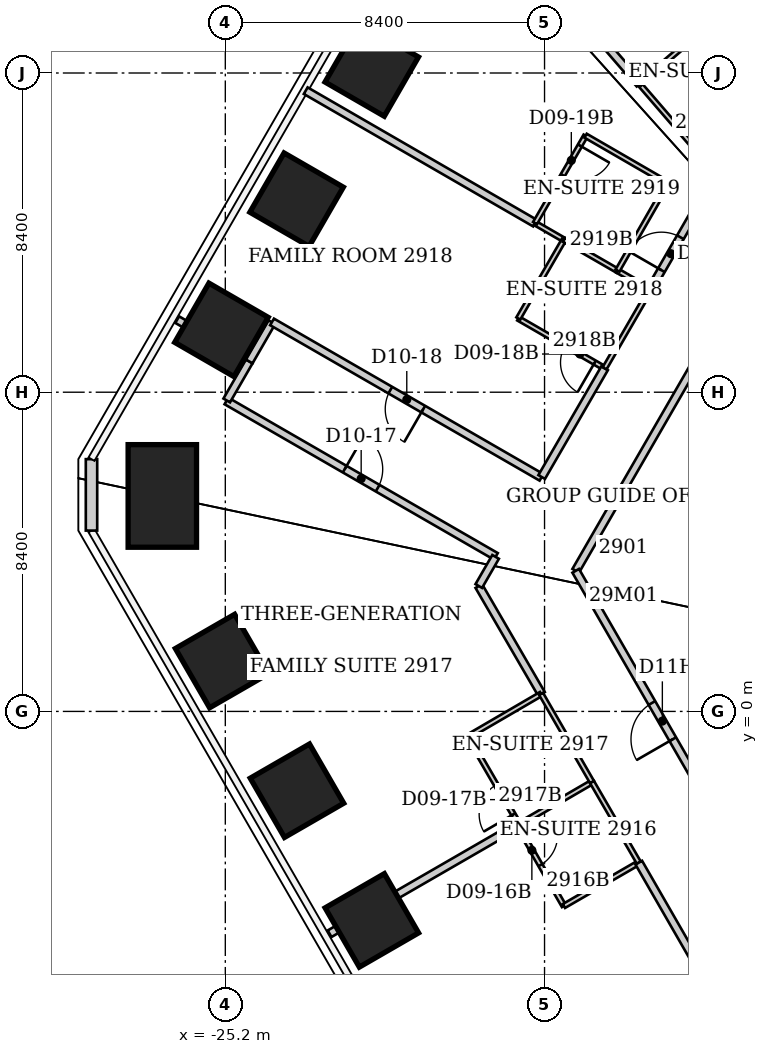
"""IFC4 building model, lengths in metres.
Left out: names, types, materials, properties, quantities, classifications, styles, units other than length and angle.
Written with IfcOpenShell. Run it as: python <this file> out.ifc"""

import sys

from ifc_helpers import new_model, si_unit, direction, frame, frame_2d, origin, origin_2d, place, context, subcontext, project, spatial, rectangle, extrude, element, fill, save


model = new_model("IFC4")
c1 = context("Model", 3, precision=1e-05, world=origin(), true_north=direction((0.0, 1.0)))
c2 = subcontext(c1, "Body", "Model", "MODEL_VIEW")
j1 = project(units=[si_unit("LENGTHUNIT", "METRE"), si_unit("PLANEANGLEUNIT", "RADIAN")], contexts=[c1])
p1 = place(None, origin())
s1 = spatial("IfcSite", under=j1, at=p1, CompositionType="ELEMENT")
p2 = place(p1, origin())
s2 = spatial("IfcBuilding", under=s1, at=p2, CompositionType="ELEMENT")
p3 = place(p2, frame((0.0, 0.0, 119.6)))
s3 = spatial("IfcBuildingStorey", under=s2, at=p3, CompositionType="ELEMENT", Elevation=119.6)
for number, where, z_axis, x_axis in (
    (1, (-21.344, -5.499, 0.0), (0.0, 0.0, 1.0), (-0.866, -0.5, 0.0)),
    (2, (-23.314, -2.087, 0.0), (0.0, 0.0, 1.0), (-0.866, -0.5, 0.0)),
    (3, (-25.284, 1.325, 0.0), (0.0, 0.0, 1.0), (-0.866, -0.5, 0.0)),
):
    element("IfcColumn", number, at=place(p3, frame(where, z_axis=z_axis, x_axis=x_axis)), inside=s3, PredefinedType="COLUMN", context=c2, shape_type="SweptSolid", body=[
        extrude(rectangle(XDim=1.8, YDim=1.8, at=origin_2d()), origin(), (0.0, 0.0, 1.0), 3.8),
    ])
p4 = place(p3, frame((-26.857, 5.67, 0.0), z_axis=(0.0, 0.0, 1.0), x_axis=(-1.0, 0.0, 0.0)))
e4 = element("IfcColumn", 4, at=p4, inside=s3, PredefinedType="COLUMN", context=c2, shape_type="SweptSolid", body=[
    extrude(rectangle(XDim=1.8, YDim=2.7, at=origin_2d()), origin(), (0.0, 0.0, 1.0), 3.8),
])
for number, where, z_axis, x_axis in (
    (5, (-25.302, 10.041, 0.0), (0.0, 0.0, 1.0), (-0.866, 0.5, 0.0)),
    (6, (-23.324, 13.466, 0.0), (0.0, 0.0, 1.0), (-0.866, 0.5, 0.0)),
    (7, (-21.346, 16.891, 0.0), (0.0, 0.0, 1.0), (-0.866, 0.5, 0.0)),
):
    element("IfcColumn", number, at=place(p3, frame(where, z_axis=z_axis, x_axis=x_axis)), inside=s3, PredefinedType="COLUMN", context=c2, shape_type="SweptSolid", body=[
        extrude(rectangle(XDim=1.8, YDim=1.8, at=origin_2d()), origin(), (0.0, 0.0, 1.0), 3.8),
    ])
p5 = place(p3, frame((-28.721, 4.759, 0.0), z_axis=(0.0, 0.0, 1.0), x_axis=(0.0, 1.0, 0.0)))
e8 = element("IfcWall", 8, at=p5, inside=s3, PredefinedType="SOLIDWALL", context=c2, shape_type="SweptSolid", body=[
    extrude(rectangle(XDim=1.88, YDim=0.3, at=frame_2d((0.94, 0.0))), origin(), (0.0, 0.0, 1.0), 3.64),
])
p6 = place(p3, frame((-26.466, 10.31, 0.0), z_axis=(0.0, 0.0, 1.0), x_axis=(0.865037029405, -0.501708020425, 0.0)))
e9 = element("IfcWall", 9, at=p6, inside=s3, PredefinedType="PARTITIONING", context=c2, shape_type="SweptSolid", body=[
    extrude(rectangle(XDim=2.177, YDim=0.2, at=frame_2d((1.089, 0.0))), origin(), (0.0, 0.0, 1.0), 3.64),
])
p7 = place(p3, frame((-25.17, 8.17, 0.0), z_axis=(0.0, 0.0, 1.0), x_axis=(0.866209421097, -0.499681137129, 0.0)))
e10 = element("IfcWall", 10, at=p7, inside=s3, PredefinedType="PARTITIONING", context=c2, shape_type="SweptSolid", body=[
    extrude(rectangle(XDim=8.185, YDim=0.2, at=frame_2d((4.092, 0.0))), origin(), (0.0, 0.0, 1.0), 3.64),
])
p8 = place(p7, frame((3.593, 0.0, 0.0)))
e11 = element("IfcOpeningElement", 11, at=p8, cuts=e10, PredefinedType="OPENING", context=c2, shape_type="SweptSolid", body=[
    extrude(rectangle(XDim=1.0, YDim=2.13, at=frame_2d((0.5, 1.065))), frame((0.0, 0.1, 0.0), z_axis=(0.0, -1.0, 0.0), x_axis=(1.0, 0.0, 0.0)), (0.0, 0.0, 1.0), 0.2),
])
p9 = place(p3, frame((-25.163, 8.183, 0.0), z_axis=(0.0, 0.0, 1.0), x_axis=(0.499793761865, 0.866144442689, 0.0)))
e12 = element("IfcWall", 12, at=p9, inside=s3, PredefinedType="PARTITIONING", context=c2, shape_type="SweptSolid", body=[
    extrude(rectangle(XDim=1.186, YDim=0.2, at=frame_2d((0.593, 0.0))), origin(), (0.0, 0.0, 1.0), 3.64),
])
p10 = place(p3, frame((-24.57, 9.21, 0.0), z_axis=(0.0, 0.0, 1.0), x_axis=(0.499734288277, 0.866178758179, 0.0)))
e13 = element("IfcWall", 13, at=p10, inside=s3, PredefinedType="PARTITIONING", context=c2, shape_type="SweptSolid", body=[
    extrude(rectangle(XDim=1.191, YDim=0.2, at=frame_2d((0.595, 0.0))), origin(), (0.0, 0.0, 1.0), 3.64),
])
p11 = place(p3, frame((-23.084, 16.335, 0.0), z_axis=(0.0, 0.0, 1.0), x_axis=(0.865889693368, -0.500234983702, 0.0)))
e14 = element("IfcWall", 14, at=p11, inside=s3, PredefinedType="PARTITIONING", context=c2, shape_type="SweptSolid", body=[
    extrude(rectangle(XDim=6.968, YDim=0.2, at=frame_2d((3.484, 0.0))), origin(), (0.0, 0.0, 1.0), 3.64),
])
p12 = place(p3, frame((-19.16, 22.127, 0.0), z_axis=(0.0, 0.0, 1.0), x_axis=(0.654324699903, -0.756213717871, 0.0)))
e15 = element("IfcWall", 15, at=p12, inside=s3, PredefinedType="PARTITIONING", context=c2, shape_type="SweptSolid", body=[
    extrude(rectangle(XDim=7.428, YDim=0.2, at=frame_2d((3.714, 0.0))), origin(), (0.0, 0.0, 1.0), 3.64),
])
p13 = place(p3, frame((-18.81, -0.66, 0.0), z_axis=(0.0, 0.0, 1.0), x_axis=(0.501789229896, -0.86498992408, 0.0)))
e16 = element("IfcWall", 16, at=p13, inside=s3, PredefinedType="PARTITIONING", context=c2, shape_type="SweptSolid", body=[
    extrude(rectangle(XDim=2.671, YDim=0.12, at=frame_2d((1.335, 0.0))), origin(), (0.0, 0.0, 1.0), 3.64),
])
p14 = place(p13, frame((1.47, 0.0, 0.0)))
e17 = element("IfcOpeningElement", 17, at=p14, cuts=e16, PredefinedType="OPENING", context=c2, shape_type="SweptSolid", body=[
    extrude(rectangle(XDim=0.9, YDim=2.03, at=frame_2d((0.45, 1.015))), frame((0.0, 0.06, 0.0), z_axis=(0.0, -1.0, 0.0), x_axis=(1.0, 0.0, 0.0)), (0.0, 0.0, 1.0), 0.12),
])
p15 = place(p3, frame((-18.53, 3.3, 0.0), z_axis=(0.0, 0.0, 1.0), x_axis=(0.502321995867, -0.864680641895, 0.0)))
e18 = element("IfcWall", 18, at=p15, inside=s3, PredefinedType="PARTITIONING", context=c2, shape_type="SweptSolid", body=[
    extrude(rectangle(XDim=3.285, YDim=0.2, at=frame_2d((1.642, 0.0))), origin(), (0.0, 0.0, 1.0), 3.64),
])
p16 = place(p3, frame((-18.087, 4.067, 0.0), z_axis=(0.0, 0.0, 1.0), x_axis=(-0.499905448813, -0.866079986056, 0.0)))
e19 = element("IfcWall", 19, at=p16, inside=s3, PredefinedType="PARTITIONING", context=c2, shape_type="SweptSolid", body=[
    extrude(rectangle(XDim=0.885, YDim=0.2, at=frame_2d((0.443, 0.0))), origin(), (0.0, 0.0, 1.0), 3.64),
])
p17 = place(p3, frame((-17.51, -3.0, 0.0), z_axis=(0.0, 0.0, 1.0), x_axis=(0.864434275542, 0.502745843611, 0.0)))
e20 = element("IfcWall", 20, at=p17, inside=s3, PredefinedType="PARTITIONING", context=c2, shape_type="SweptSolid", body=[
    extrude(rectangle(XDim=2.267, YDim=0.12, at=frame_2d((1.134, 0.0))), origin(), (0.0, 0.0, 1.0), 3.64),
])
p18 = place(p3, frame((-17.508, -3.004, 0.0), z_axis=(0.0, 0.0, 1.0), x_axis=(0.498775507858, -0.866731211369, 0.0)))
e21 = element("IfcWall", 21, at=p18, inside=s3, PredefinedType="PARTITIONING", context=c2, shape_type="SweptSolid", body=[
    extrude(rectangle(XDim=2.441, YDim=0.12, at=frame_2d((1.22, 0.0))), origin(), (0.0, 0.0, 1.0), 3.64),
])
p19 = place(p18, frame((0.3, 0.0, 0.0)))
e22 = element("IfcOpeningElement", 22, at=p19, cuts=e21, PredefinedType="OPENING", context=c2, shape_type="SweptSolid", body=[
    extrude(rectangle(XDim=0.9, YDim=2.03, at=frame_2d((0.45, 1.015))), frame((0.0, 0.06, 0.0), z_axis=(0.0, -1.0, 0.0), x_axis=(1.0, 0.0, 0.0)), (0.0, 0.0, 1.0), 0.12),
])
p20 = place(p3, frame((-17.49, 10.34, 0.0), z_axis=(0.0, 0.0, 1.0), x_axis=(0.866114241029, -0.499846097802, 0.0)))
e23 = element("IfcWall", 23, at=p20, inside=s3, PredefinedType="PARTITIONING", context=c2, shape_type="SweptSolid", body=[
    extrude(rectangle(XDim=2.621, YDim=0.12, at=frame_2d((1.311, 0.0))), origin(), (0.0, 0.0, 1.0), 3.64),
])
p21 = place(p20, frame((1.421, 0.0, 0.0)))
e24 = element("IfcOpeningElement", 24, at=p21, cuts=e23, PredefinedType="OPENING", context=c2, shape_type="SweptSolid", body=[
    extrude(rectangle(XDim=0.9, YDim=2.03, at=frame_2d((0.45, 1.015))), frame((0.0, 0.06, 0.0), z_axis=(0.0, -1.0, 0.0), x_axis=(1.0, 0.0, 0.0)), (0.0, 0.0, 1.0), 0.12),
])
p22 = place(p3, frame((-17.47, -2.97, 0.0), z_axis=(0.0, 0.0, 1.0), x_axis=(-0.865919350456, -0.50018364478, 0.0)))
e25 = element("IfcWall", 25, at=p22, inside=s3, PredefinedType="PARTITIONING", context=c2, shape_type="SweptSolid", body=[
    extrude(rectangle(XDim=5.758, YDim=0.2, at=frame_2d((2.879, 0.0))), origin(), (0.0, 0.0, 1.0), 3.64),
])
p23 = place(p3, frame((-17.051, 12.849, 0.0), z_axis=(0.0, 0.0, 1.0), x_axis=(0.865838315616, -0.500323906295, 0.0)))
e26 = element("IfcWall", 26, at=p23, inside=s3, PredefinedType="PARTITIONING", context=c2, shape_type="SweptSolid", body=[
    extrude(rectangle(XDim=0.878, YDim=0.12, at=frame_2d((0.439, 0.0))), origin(), (0.0, 0.0, 1.0), 3.64),
])
p24 = place(p3, frame((-16.89, 0.46, 0.0), z_axis=(0.0, 0.0, 1.0), x_axis=(-0.863822716314, -0.503795905878, 0.0)))
e27 = element("IfcWall", 27, at=p24, inside=s3, PredefinedType="PARTITIONING", context=c2, shape_type="SweptSolid", body=[
    extrude(rectangle(XDim=2.223, YDim=0.12, at=frame_2d((1.111, 0.0))), origin(), (0.0, 0.0, 1.0), 3.64),
])
p25 = place(p3, frame((-16.88, 6.16, 0.0), z_axis=(0.0, 0.0, 1.0), x_axis=(-0.866203958324, 0.499690606859, 0.0)))
e28 = element("IfcWall", 28, at=p25, inside=s3, PredefinedType="PARTITIONING", context=c2, shape_type="SweptSolid", body=[
    extrude(rectangle(XDim=8.185, YDim=0.2, at=frame_2d((4.093, 0.0))), origin(), (0.0, 0.0, 1.0), 3.64),
])
p26 = place(p25, frame((3.593, 0.0, 0.0)))
e29 = element("IfcOpeningElement", 29, at=p26, cuts=e28, PredefinedType="OPENING", context=c2, shape_type="SweptSolid", body=[
    extrude(rectangle(XDim=1.0, YDim=2.13, at=frame_2d((0.5, 1.065))), frame((0.0, 0.1, 0.0), z_axis=(0.0, -1.0, 0.0), x_axis=(1.0, 0.0, 0.0)), (0.0, 0.0, 1.0), 0.2),
])
p27 = place(p3, frame((-16.875, 6.169, 0.0), z_axis=(0.0, 0.0, 1.0), x_axis=(0.500689767595, 0.865626799854, 0.0)))
e30 = element("IfcWall", 30, at=p27, inside=s3, PredefinedType="PARTITIONING", context=c2, shape_type="SweptSolid", body=[
    extrude(rectangle(XDim=3.305, YDim=0.2, at=frame_2d((1.653, 0.0))), origin(), (0.0, 0.0, 1.0), 3.64),
])
p28 = place(p3, frame((-16.29, -5.12, 0.0), z_axis=(0.0, 0.0, 1.0), x_axis=(0.865497265561, 0.500913648553, 0.0)))
e31 = element("IfcWall", 31, at=p28, inside=s3, PredefinedType="PARTITIONING", context=c2, shape_type="SweptSolid", body=[
    extrude(rectangle(XDim=2.276, YDim=0.12, at=frame_2d((1.138, 0.0))), origin(), (0.0, 0.0, 1.0), 3.64),
])
p29 = place(p3, frame((-16.29, 12.41, 0.0), z_axis=(0.0, 0.0, 1.0), x_axis=(-0.501547039172, -0.865130376012, 0.0)))
e32 = element("IfcWall", 32, at=p29, inside=s3, PredefinedType="PARTITIONING", context=c2, shape_type="SweptSolid", body=[
    extrude(rectangle(XDim=2.393, YDim=0.12, at=frame_2d((1.196, 0.0))), origin(), (0.0, 0.0, 1.0), 3.64),
])
p30 = place(p3, frame((-16.29, 12.41, 0.0), z_axis=(0.0, 0.0, 1.0), x_axis=(0.866138091645, -0.499804768086, 0.0)))
e33 = element("IfcWall", 33, at=p30, inside=s3, PredefinedType="PARTITIONING", context=c2, shape_type="SweptSolid", body=[
    extrude(rectangle(XDim=1.626, YDim=0.12, at=frame_2d((0.813, 0.0))), origin(), (0.0, 0.0, 1.0), 3.64),
])
p31 = place(p3, frame((-15.98, 3.7, 0.0), z_axis=(0.0, 0.0, 1.0), x_axis=(0.500093981358, 0.865971136822, 0.0)))
e34 = element("IfcWall", 34, at=p31, inside=s3, PredefinedType="PARTITIONING", context=c2, shape_type="SweptSolid", body=[
    extrude(rectangle(XDim=8.418, YDim=0.2, at=frame_2d((4.209, 0.0))), origin(), (0.0, 0.0, 1.0), 3.64),
])
p32 = place(p3, frame((-15.72, 15.15, 0.0), z_axis=(0.0, 0.0, 1.0), x_axis=(-0.500605174168, -0.865675724273, 0.0)))
e35 = element("IfcWall", 35, at=p32, inside=s3, PredefinedType="PARTITIONING", context=c2, shape_type="SweptSolid", body=[
    extrude(rectangle(XDim=2.657, YDim=0.12, at=frame_2d((1.329, 0.0))), origin(), (0.0, 0.0, 1.0), 3.64),
])
p33 = place(p32, frame((0.3, 0.0, 0.0)))
e36 = element("IfcOpeningElement", 36, at=p33, cuts=e35, PredefinedType="OPENING", context=c2, shape_type="SweptSolid", body=[
    extrude(rectangle(XDim=0.9, YDim=2.03, at=frame_2d((0.45, 1.015))), frame((0.0, 0.06, 0.0), z_axis=(0.0, -1.0, 0.0), x_axis=(1.0, 0.0, 0.0)), (0.0, 0.0, 1.0), 0.12),
])
p34 = place(p3, frame((-15.55, -1.86, 0.0), z_axis=(0.0, 0.0, 1.0), x_axis=(-0.500098439427, 0.865968562295, 0.0)))
e37 = element("IfcWall", 37, at=p34, inside=s3, PredefinedType="PARTITIONING", context=c2, shape_type="SweptSolid", body=[
    extrude(rectangle(XDim=2.679, YDim=0.12, at=frame_2d((1.34, 0.0))), origin(), (0.0, 0.0, 1.0), 3.64),
])
p35 = place(p3, frame((-15.55, -1.86, 0.0), z_axis=(0.0, 0.0, 1.0), x_axis=(0.501856726365, -0.86495076519, 0.0)))
e38 = element("IfcWall", 38, at=p35, inside=s3, PredefinedType="PARTITIONING", context=c2, shape_type="SweptSolid", body=[
    extrude(rectangle(XDim=2.451, YDim=0.12, at=frame_2d((1.226, 0.0))), origin(), (0.0, 0.0, 1.0), 3.64),
])
p36 = place(p3, frame((-15.22, 9.03, 0.0), z_axis=(0.0, 0.0, 1.0), x_axis=(0.501502765098, 0.865156041763, 0.0)))
e39 = element("IfcWall", 39, at=p36, inside=s3, PredefinedType="PARTITIONING", context=c2, shape_type="SweptSolid", body=[
    extrude(rectangle(XDim=2.393, YDim=0.12, at=frame_2d((1.196, 0.0))), origin(), (0.0, 0.0, 1.0), 3.64),
])
p37 = place(p3, frame((-14.882, 11.597, 0.0), z_axis=(0.0, 0.0, 1.0), x_axis=(0.866181499781, -0.499729536286, 0.0)))
e40 = element("IfcWall", 40, at=p37, inside=s3, PredefinedType="PARTITIONING", context=c2, shape_type="SweptSolid", body=[
    extrude(rectangle(XDim=0.995, YDim=0.12, at=frame_2d((0.497, 0.0))), origin(), (0.0, 0.0, 1.0), 3.64),
])
p38 = place(p3, frame((-14.88, 11.6, 0.0), z_axis=(0.0, 0.0, 1.0), x_axis=(0.497704656183, 0.867346571569, 0.0)))
e41 = element("IfcWall", 41, at=p38, inside=s3, PredefinedType="PARTITIONING", context=c2, shape_type="SweptSolid", body=[
    extrude(rectangle(XDim=2.652, YDim=0.12, at=frame_2d((1.326, 0.0))), origin(), (0.0, 0.0, 1.0), 3.64),
])
p39 = place(p3, frame((-14.32, -3.98, 0.0), z_axis=(0.0, 0.0, 1.0), x_axis=(0.49899372311, -0.866605599046, 0.0)))
e42 = element("IfcWall", 42, at=p39, inside=s3, PredefinedType="PARTITIONING", context=c2, shape_type="SweptSolid", body=[
    extrude(rectangle(XDim=4.555, YDim=0.2, at=frame_2d((2.277, 0.0))), origin(), (0.0, 0.0, 1.0), 3.64),
])
p40 = place(p3, frame((-14.3, 16.51, 0.0), z_axis=(0.0, 0.0, 1.0), x_axis=(0.653188728136, -0.757195143563, 0.0)))
e43 = element("IfcWall", 43, at=p40, inside=s3, PredefinedType="PARTITIONING", context=c2, shape_type="SweptSolid", body=[
    extrude(rectangle(XDim=2.404, YDim=0.12, at=frame_2d((1.202, 0.0))), origin(), (0.0, 0.0, 1.0), 3.64),
])
p41 = place(p3, frame((-14.02, 11.1, 0.0), z_axis=(0.0, 0.0, 1.0), x_axis=(0.499641723021, 0.866232156305, 0.0)))
e44 = element("IfcWall", 44, at=p41, inside=s3, PredefinedType="PARTITIONING", context=c2, shape_type="SweptSolid", body=[
    extrude(rectangle(XDim=2.182, YDim=0.2, at=frame_2d((1.091, 0.0))), origin(), (0.0, 0.0, 1.0), 3.64),
])
p42 = place(p41, frame((0.591, 0.0, 0.0)))
e45 = element("IfcOpeningElement", 45, at=p42, cuts=e44, PredefinedType="OPENING", context=c2, shape_type="SweptSolid", body=[
    extrude(rectangle(XDim=1.0, YDim=2.13, at=frame_2d((0.5, 1.065))), frame((0.0, 0.1, 0.0), z_axis=(0.0, -1.0, 0.0), x_axis=(1.0, 0.0, 0.0)), (0.0, 0.0, 1.0), 0.2),
])
p43 = place(p3, frame((-13.56, 13.9, 0.0), z_axis=(0.0, 0.0, 1.0), x_axis=(-0.865508881864, 0.500893576935, 0.0)))
e46 = element("IfcWall", 46, at=p43, inside=s3, PredefinedType="PARTITIONING", context=c2, shape_type="SweptSolid", body=[
    extrude(rectangle(XDim=2.496, YDim=0.12, at=frame_2d((1.248, 0.0))), origin(), (0.0, 0.0, 1.0), 3.64),
])
p44 = place(p3, frame((-12.33, 18.21, 0.0), z_axis=(0.0, 0.0, 1.0), x_axis=(-0.757086659925, -0.653314464377, 0.0)))
e47 = element("IfcWall", 47, at=p44, inside=s3, PredefinedType="PARTITIONING", context=c2, shape_type="SweptSolid", body=[
    extrude(rectangle(XDim=2.602, YDim=0.12, at=frame_2d((1.301, 0.0))), origin(), (0.0, 0.0, 1.0), 3.64),
])
p45 = place(p3, frame((-11.42, -4.21, 0.0), z_axis=(0.0, 0.0, 1.0), x_axis=(-0.499446957289, 0.866344467781, 0.0)))
e48 = element("IfcWall", 48, at=p45, inside=s3, PredefinedType="PARTITIONING", context=c2, shape_type="SweptSolid", body=[
    extrude(rectangle(XDim=9.13, YDim=0.2, at=frame_2d((4.565, 0.0))), origin(), (0.0, 0.0, 1.0), 3.64),
])
p46 = place(p45, frame((4.015, 0.0, 0.0)))
e49 = element("IfcOpeningElement", 49, at=p46, cuts=e48, PredefinedType="OPENING", context=c2, shape_type="SweptSolid", body=[
    extrude(rectangle(XDim=1.1, YDim=2.2, at=frame_2d((0.55, 1.1))), frame((0.0, 0.1, 0.0), z_axis=(0.0, -1.0, 0.0), x_axis=(1.0, 0.0, 0.0)), (0.0, 0.0, 1.0), 0.2),
])
p47 = place(p19, origin())
e50 = element("IfcDoor", 50, at=p47, inside=s3, OperationType="SINGLE_SWING_LEFT", PredefinedType="DOOR", context=c2, shape_type="SweptSolid", body=[
    extrude(rectangle(XDim=0.9, YDim=2.03, at=frame_2d((0.45, 1.015))), frame((0.0, 0.025, 0.0), z_axis=(0.0, -1.0, 0.0), x_axis=(1.0, 0.0, 0.0)), (0.0, 0.0, 1.0), 0.05),
])
fill(e22, e50)
p48 = place(p8, origin())
e51 = element("IfcDoor", 51, at=p48, inside=s3, OperationType="SINGLE_SWING_LEFT", PredefinedType="DOOR", context=c2, shape_type="SweptSolid", body=[
    extrude(rectangle(XDim=1.0, YDim=2.13, at=frame_2d((0.5, 1.065))), frame((0.0, 0.025, 0.0), z_axis=(0.0, -1.0, 0.0), x_axis=(1.0, 0.0, 0.0)), (0.0, 0.0, 1.0), 0.05),
])
fill(e11, e51)
p49 = place(p14, origin())
e52 = element("IfcDoor", 52, at=p49, inside=s3, OperationType="SINGLE_SWING_RIGHT", PredefinedType="DOOR", context=c2, shape_type="SweptSolid", body=[
    extrude(rectangle(XDim=0.9, YDim=2.03, at=frame_2d((0.45, 1.015))), frame((0.0, 0.025, 0.0), z_axis=(0.0, -1.0, 0.0), x_axis=(1.0, 0.0, 0.0)), (0.0, 0.0, 1.0), 0.05),
])
fill(e17, e52)
p50 = place(p26, origin())
e53 = element("IfcDoor", 53, at=p50, inside=s3, OperationType="SINGLE_SWING_LEFT", PredefinedType="DOOR", context=c2, shape_type="SweptSolid", body=[
    extrude(rectangle(XDim=1.0, YDim=2.13, at=frame_2d((0.5, 1.065))), frame((0.0, 0.025, 0.0), z_axis=(0.0, -1.0, 0.0), x_axis=(1.0, 0.0, 0.0)), (0.0, 0.0, 1.0), 0.05),
])
fill(e29, e53)
p51 = place(p21, origin())
e54 = element("IfcDoor", 54, at=p51, inside=s3, OperationType="SINGLE_SWING_RIGHT", PredefinedType="DOOR", context=c2, shape_type="SweptSolid", body=[
    extrude(rectangle(XDim=0.9, YDim=2.03, at=frame_2d((0.45, 1.015))), frame((0.0, 0.025, 0.0), z_axis=(0.0, -1.0, 0.0), x_axis=(1.0, 0.0, 0.0)), (0.0, 0.0, 1.0), 0.05),
])
fill(e24, e54)
p52 = place(p42, origin())
e55 = element("IfcDoor", 55, at=p52, inside=s3, OperationType="SINGLE_SWING_LEFT", PredefinedType="DOOR", context=c2, shape_type="SweptSolid", body=[
    extrude(rectangle(XDim=1.0, YDim=2.13, at=frame_2d((0.5, 1.065))), frame((0.0, 0.025, 0.0), z_axis=(0.0, -1.0, 0.0), x_axis=(1.0, 0.0, 0.0)), (0.0, 0.0, 1.0), 0.05),
])
fill(e45, e55)
p53 = place(p33, origin())
e56 = element("IfcDoor", 56, at=p53, inside=s3, OperationType="SINGLE_SWING_LEFT", PredefinedType="DOOR", context=c2, shape_type="SweptSolid", body=[
    extrude(rectangle(XDim=0.9, YDim=2.03, at=frame_2d((0.45, 1.015))), frame((0.0, 0.025, 0.0), z_axis=(0.0, -1.0, 0.0), x_axis=(1.0, 0.0, 0.0)), (0.0, 0.0, 1.0), 0.05),
])
fill(e36, e56)
p54 = place(p46, origin())
e57 = element("IfcDoor", 57, at=p54, inside=s3, OperationType="SINGLE_SWING_LEFT", PredefinedType="DOOR", context=c2, shape_type="SweptSolid", body=[
    extrude(rectangle(XDim=1.1, YDim=2.2, at=frame_2d((0.55, 1.1))), frame((0.0, 0.025, 0.0), z_axis=(0.0, -1.0, 0.0), x_axis=(1.0, 0.0, 0.0)), (0.0, 0.0, 1.0), 0.05),
])
fill(e49, e57)
save(model, sys.argv[1])
